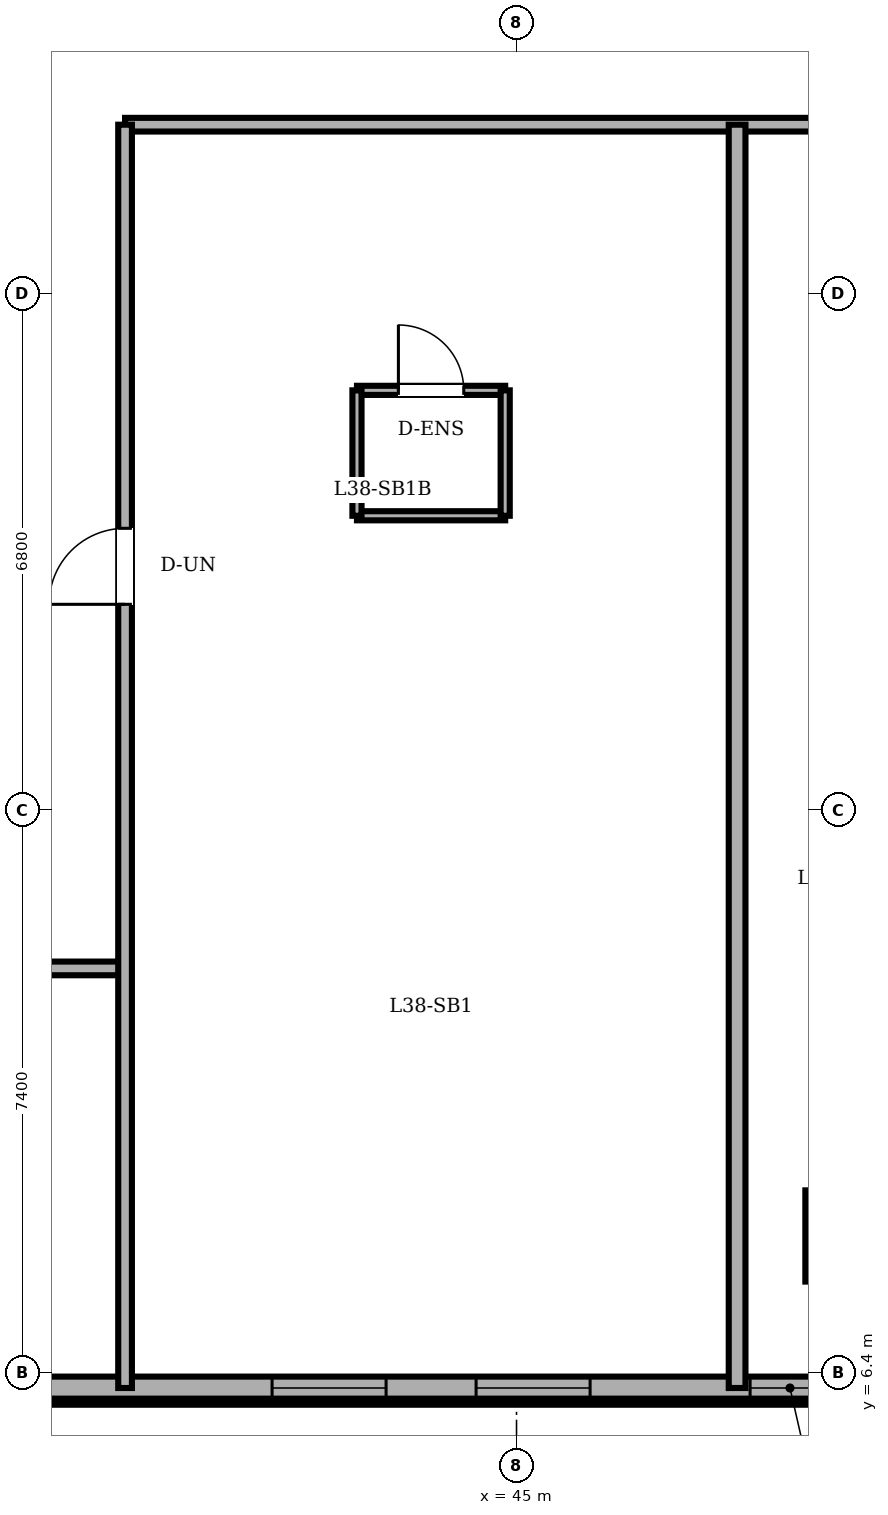
"""IFC4 building model, lengths in metres.
Left out: names, types, materials, properties, quantities, classifications, styles, units other than length and angle.
Written with IfcOpenShell. Run it as: python <this file> out.ifc"""

import sys

from ifc_helpers import new_model, si_unit, direction, frame, frame_2d, origin, origin_2d, place, context, subcontext, project, spatial, rectangle, circle, extrude, element, fill, save


model = new_model("IFC4")
c1 = context("Model", 3, precision=1e-05, world=origin(), true_north=direction((0.0, 1.0)))
c2 = subcontext(c1, "Body", "Model", "MODEL_VIEW")
j1 = project(units=[si_unit("LENGTHUNIT", "METRE"), si_unit("PLANEANGLEUNIT", "RADIAN")], contexts=[c1])
p1 = place(None, origin())
s1 = spatial("IfcSite", under=j1, at=p1, CompositionType="ELEMENT")
p2 = place(p1, origin())
s2 = spatial("IfcBuilding", under=s1, at=p2, CompositionType="ELEMENT")
p3 = place(p2, frame((0.0, 0.0, 147.4)))
s3 = spatial("IfcBuildingStorey", under=s2, at=p3, CompositionType="ELEMENT", Elevation=147.4)
p4 = place(p3, frame((49.4, 8.2, 0.0), z_axis=(0.0, 0.0, 1.0), x_axis=(1.0, 0.0, 0.0)))
e1 = element("IfcColumn", 1, at=p4, inside=s3, PredefinedType="COLUMN", context=c2, shape_type="SweptSolid", body=[
    extrude(circle(Radius=0.6, at=origin_2d()), origin(), (0.0, 0.0, 1.0), 3.6),
])
p5 = place(p3, frame((19.3, 6.2, 0.0), z_axis=(0.0, 0.0, 1.0), x_axis=(1.0, 0.0, 0.0)))
e2 = element("IfcWall", 2, at=p5, inside=s3, PredefinedType="SOLIDWALL", context=c2, shape_type="SweptSolid", body=[
    extrude(rectangle(XDim=30.282, YDim=0.3, at=frame_2d((15.141, 0.0))), origin(), (0.0, 0.0, 1.0), 3.4),
])
p6 = place(p5, frame((6.525, 0.0, 0.0)))
e3 = element("IfcOpeningElement", 3, at=p6, cuts=e2, PredefinedType="OPENING", context=c2, shape_type="SweptSolid", body=[
    extrude(rectangle(XDim=0.95, YDim=2.2, at=frame_2d((0.475, 1.1))), frame((0.0, 0.16, 0.0), z_axis=(0.0, -1.0, 0.0), x_axis=(1.0, 0.0, 0.0)), (0.0, 0.0, 1.0), 0.32),
])
p7 = place(p5, frame((1.25, 0.0, 0.85)))
e4 = element("IfcOpeningElement", 4, at=p7, cuts=e2, PredefinedType="OPENING", context=c2, shape_type="SweptSolid", body=[
    extrude(rectangle(XDim=1.5, YDim=1.55, at=frame_2d((0.75, 0.775))), frame((0.0, 0.16, 0.0), z_axis=(0.0, -1.0, 0.0), x_axis=(1.0, 0.0, 0.0)), (0.0, 0.0, 1.0), 0.32),
])
p8 = place(p5, frame((2.9, 0.0, 0.85)))
e5 = element("IfcOpeningElement", 5, at=p8, cuts=e2, PredefinedType="OPENING", context=c2, shape_type="SweptSolid", body=[
    extrude(rectangle(XDim=1.5, YDim=1.55, at=frame_2d((0.75, 0.775))), frame((0.0, 0.16, 0.0), z_axis=(0.0, -1.0, 0.0), x_axis=(1.0, 0.0, 0.0)), (0.0, 0.0, 1.0), 0.32),
])
p9 = place(p5, frame((12.167, 0.0, 0.85)))
e6 = element("IfcOpeningElement", 6, at=p9, cuts=e2, PredefinedType="OPENING", context=c2, shape_type="SweptSolid", body=[
    extrude(rectangle(XDim=1.5, YDim=1.55, at=frame_2d((0.75, 0.775))), frame((0.0, 0.16, 0.0), z_axis=(0.0, -1.0, 0.0), x_axis=(1.0, 0.0, 0.0)), (0.0, 0.0, 1.0), 0.32),
])
p10 = place(p5, frame((15.983, 0.0, 0.85)))
e7 = element("IfcOpeningElement", 7, at=p10, cuts=e2, PredefinedType="OPENING", context=c2, shape_type="SweptSolid", body=[
    extrude(rectangle(XDim=1.5, YDim=1.55, at=frame_2d((0.75, 0.775))), frame((0.0, 0.16, 0.0), z_axis=(0.0, -1.0, 0.0), x_axis=(1.0, 0.0, 0.0)), (0.0, 0.0, 1.0), 0.32),
])
p11 = place(p5, frame((22.484, 0.0, 0.85)))
e8 = element("IfcOpeningElement", 8, at=p11, cuts=e2, PredefinedType="OPENING", context=c2, shape_type="SweptSolid", body=[
    extrude(rectangle(XDim=1.5, YDim=1.55, at=frame_2d((0.75, 0.775))), frame((0.0, 0.16, 0.0), z_axis=(0.0, -1.0, 0.0), x_axis=(1.0, 0.0, 0.0)), (0.0, 0.0, 1.0), 0.32),
])
p12 = place(p5, frame((25.168, 0.0, 0.85)))
e9 = element("IfcOpeningElement", 9, at=p12, cuts=e2, PredefinedType="OPENING", context=c2, shape_type="SweptSolid", body=[
    extrude(rectangle(XDim=1.5, YDim=1.55, at=frame_2d((0.75, 0.775))), frame((0.0, 0.16, 0.0), z_axis=(0.0, -1.0, 0.0), x_axis=(1.0, 0.0, 0.0)), (0.0, 0.0, 1.0), 0.32),
])
p13 = place(p5, frame((28.773, 0.0, 0.85)))
e10 = element("IfcOpeningElement", 10, at=p13, cuts=e2, PredefinedType="OPENING", context=c2, shape_type="SweptSolid", body=[
    extrude(rectangle(XDim=1.05, YDim=1.55, at=frame_2d((0.525, 0.775))), frame((0.0, 0.16, 0.0), z_axis=(0.0, -1.0, 0.0), x_axis=(1.0, 0.0, 0.0)), (0.0, 0.0, 1.0), 0.32),
])
p14 = place(p3, frame((42.901, 19.325, 0.0), z_axis=(0.0, 0.0, 1.0), x_axis=(1.0, 0.0, 0.0)))
e11 = element("IfcWall", 11, at=p14, inside=s3, PredefinedType="PARTITIONING", context=c2, shape_type="SweptSolid", body=[
    extrude(rectangle(XDim=1.95, YDim=0.12, at=frame_2d((0.975, 0.0))), origin(), (0.0, 0.0, 1.0), 3.4),
])
p15 = place(p14, frame((0.545, 0.0, 0.0)))
e12 = element("IfcOpeningElement", 12, at=p15, cuts=e11, PredefinedType="OPENING", context=c2, shape_type="SweptSolid", body=[
    extrude(rectangle(XDim=0.86, YDim=2.1, at=frame_2d((0.43, 1.05))), frame((0.0, 0.07, 0.0), z_axis=(0.0, -1.0, 0.0), x_axis=(1.0, 0.0, 0.0)), (0.0, 0.0, 1.0), 0.14),
])
p16 = place(p3, frame((44.851, 17.675, 0.0), z_axis=(0.0, 0.0, 1.0), x_axis=(-1.0, 0.0, 0.0)))
e13 = element("IfcWall", 13, at=p16, inside=s3, PredefinedType="PARTITIONING", context=c2, shape_type="SweptSolid", body=[
    extrude(rectangle(XDim=1.95, YDim=0.12, at=frame_2d((0.975, 0.0))), origin(), (0.0, 0.0, 1.0), 3.4),
])
for number, where, z_axis, x_axis in (
    (14, (42.901, 19.325, 0.0), (0.0, 0.0, 1.0), (0.0, -1.0, 0.0)),
    (15, (44.851, 17.675, 0.0), (0.0, 0.0, 1.0), (0.0, 1.0, 0.0)),
):
    element("IfcWall", number, at=place(p3, frame(where, z_axis=z_axis, x_axis=x_axis)), inside=s3, PredefinedType="PARTITIONING", context=c2, shape_type="SweptSolid", body=[
        extrude(rectangle(XDim=1.65, YDim=0.12, at=frame_2d((0.825, 0.0))), origin(), (0.0, 0.0, 1.0), 3.4),
    ])
p17 = place(p3, frame((13.8, 11.72, 0.0), z_axis=(0.0, 0.0, 1.0), x_axis=(1.0, 0.0, 0.0)))
e16 = element("IfcWall", 16, at=p17, inside=s3, PredefinedType="PARTITIONING", context=c2, shape_type="SweptSolid", body=[
    extrude(rectangle(XDim=26.05, YDim=0.18, at=frame_2d((13.025, 0.0))), origin(), (0.0, 0.0, 1.0), 3.4),
])
p18 = place(p17, frame((12.24, 0.0, 0.0)))
e17 = element("IfcOpeningElement", 17, at=p18, cuts=e16, PredefinedType="OPENING", context=c2, shape_type="SweptSolid", body=[
    extrude(rectangle(XDim=0.92, YDim=2.1, at=frame_2d((0.46, 1.05))), frame((0.0, 0.1, 0.0), z_axis=(0.0, -1.0, 0.0), x_axis=(1.0, 0.0, 0.0)), (0.0, 0.0, 1.0), 0.2),
])
p19 = place(p17, frame((5.54, 0.0, 0.0)))
e18 = element("IfcOpeningElement", 18, at=p19, cuts=e16, PredefinedType="OPENING", context=c2, shape_type="SweptSolid", body=[
    extrude(rectangle(XDim=0.92, YDim=2.1, at=frame_2d((0.46, 1.05))), frame((0.0, 0.1, 0.0), z_axis=(0.0, -1.0, 0.0), x_axis=(1.0, 0.0, 0.0)), (0.0, 0.0, 1.0), 0.2),
])
p20 = place(p17, frame((19.605, 0.0, 0.0)))
e19 = element("IfcOpeningElement", 19, at=p20, cuts=e16, PredefinedType="OPENING", context=c2, shape_type="SweptSolid", body=[
    extrude(rectangle(XDim=0.92, YDim=2.1, at=frame_2d((0.46, 1.05))), frame((0.0, 0.1, 0.0), z_axis=(0.0, -1.0, 0.0), x_axis=(1.0, 0.0, 0.0)), (0.0, 0.0, 1.0), 0.2),
])
p21 = place(p3, frame((39.85, 22.82, 0.0), z_axis=(0.0, 0.0, 1.0), x_axis=(1.0, 0.0, 0.0)))
e20 = element("IfcWall", 20, at=p21, inside=s3, PredefinedType="PARTITIONING", context=c2, shape_type="SweptSolid", body=[
    extrude(rectangle(XDim=12.2, YDim=0.18, at=frame_2d((6.1, 0.0))), origin(), (0.0, 0.0, 1.0), 3.4),
])
p22 = place(p21, frame((9.366, 0.0, 0.0)))
e21 = element("IfcOpeningElement", 21, at=p22, cuts=e20, PredefinedType="OPENING", context=c2, shape_type="SweptSolid", body=[
    extrude(rectangle(XDim=1.0, YDim=2.15, at=frame_2d((0.5, 1.075))), frame((0.0, 0.1, 0.0), z_axis=(0.0, -1.0, 0.0), x_axis=(1.0, 0.0, 0.0)), (0.0, 0.0, 1.0), 0.2),
])
p23 = place(p3, frame((39.85, 6.2, 0.0), z_axis=(0.0, 0.0, 1.0), x_axis=(0.0, 1.0, 0.0)))
e22 = element("IfcWall", 22, at=p23, inside=s3, PredefinedType="PARTITIONING", context=c2, shape_type="SweptSolid", body=[
    extrude(rectangle(XDim=16.62, YDim=0.18, at=frame_2d((8.31, 0.0))), origin(), (0.0, 0.0, 1.0), 3.4),
])
p24 = place(p23, frame((10.31, 0.0, 0.0)))
e23 = element("IfcOpeningElement", 23, at=p24, cuts=e22, PredefinedType="OPENING", context=c2, shape_type="SweptSolid", body=[
    extrude(rectangle(XDim=1.0, YDim=2.15, at=frame_2d((0.5, 1.075))), frame((0.0, 0.1, 0.0), z_axis=(0.0, -1.0, 0.0), x_axis=(1.0, 0.0, 0.0)), (0.0, 0.0, 1.0), 0.2),
])
p25 = place(p3, frame((47.902, 6.2, 0.0), z_axis=(0.0, 0.0, 1.0), x_axis=(0.0, 1.0, 0.0)))
e24 = element("IfcWall", 24, at=p25, inside=s3, PredefinedType="PARTITIONING", context=c2, shape_type="SweptSolid", body=[
    extrude(rectangle(XDim=16.62, YDim=0.22, at=frame_2d((8.31, 0.0))), origin(), (0.0, 0.0, 1.0), 3.4),
])
p26 = place(p11, origin())
e25 = element("IfcWindow", 25, at=p26, inside=s3, PartitioningType="DOUBLE_PANEL_VERTICAL", PredefinedType="WINDOW", context=c2, shape_type="SweptSolid", body=[
    extrude(rectangle(XDim=1.5, YDim=1.55, at=frame_2d((0.75, 0.775))), frame((0.0, 0.03, 0.0), z_axis=(0.0, -1.0, 0.0), x_axis=(1.0, 0.0, 0.0)), (0.0, 0.0, 1.0), 0.06),
])
fill(e8, e25)
p27 = place(p12, origin())
e26 = element("IfcWindow", 26, at=p27, inside=s3, PartitioningType="DOUBLE_PANEL_VERTICAL", PredefinedType="WINDOW", context=c2, shape_type="SweptSolid", body=[
    extrude(rectangle(XDim=1.5, YDim=1.55, at=frame_2d((0.75, 0.775))), frame((0.0, 0.03, 0.0), z_axis=(0.0, -1.0, 0.0), x_axis=(1.0, 0.0, 0.0)), (0.0, 0.0, 1.0), 0.06),
])
fill(e9, e26)
p28 = place(p13, origin())
e27 = element("IfcWindow", 27, at=p28, inside=s3, PartitioningType="SINGLE_PANEL", PredefinedType="WINDOW", context=c2, shape_type="SweptSolid", body=[
    extrude(rectangle(XDim=1.05, YDim=1.55, at=frame_2d((0.525, 0.775))), frame((0.0, 0.03, 0.0), z_axis=(0.0, -1.0, 0.0), x_axis=(1.0, 0.0, 0.0)), (0.0, 0.0, 1.0), 0.06),
])
fill(e10, e27)
p29 = place(p15, origin())
e28 = element("IfcDoor", 28, at=p29, inside=s3, OperationType="SINGLE_SWING_LEFT", PredefinedType="DOOR", context=c2, shape_type="SweptSolid", body=[
    extrude(rectangle(XDim=0.86, YDim=2.1, at=frame_2d((0.43, 1.05))), frame((0.0, 0.025, 0.0), z_axis=(0.0, -1.0, 0.0), x_axis=(1.0, 0.0, 0.0)), (0.0, 0.0, 1.0), 0.05),
])
fill(e12, e28)
p30 = place(p24, origin())
e29 = element("IfcDoor", 29, at=p30, inside=s3, OperationType="SINGLE_SWING_LEFT", PredefinedType="DOOR", context=c2, shape_type="SweptSolid", body=[
    extrude(rectangle(XDim=1.0, YDim=2.15, at=frame_2d((0.5, 1.075))), frame((0.0, 0.025, 0.0), z_axis=(0.0, -1.0, 0.0), x_axis=(1.0, 0.0, 0.0)), (0.0, 0.0, 1.0), 0.05),
])
fill(e23, e29)
save(model, sys.argv[1])
